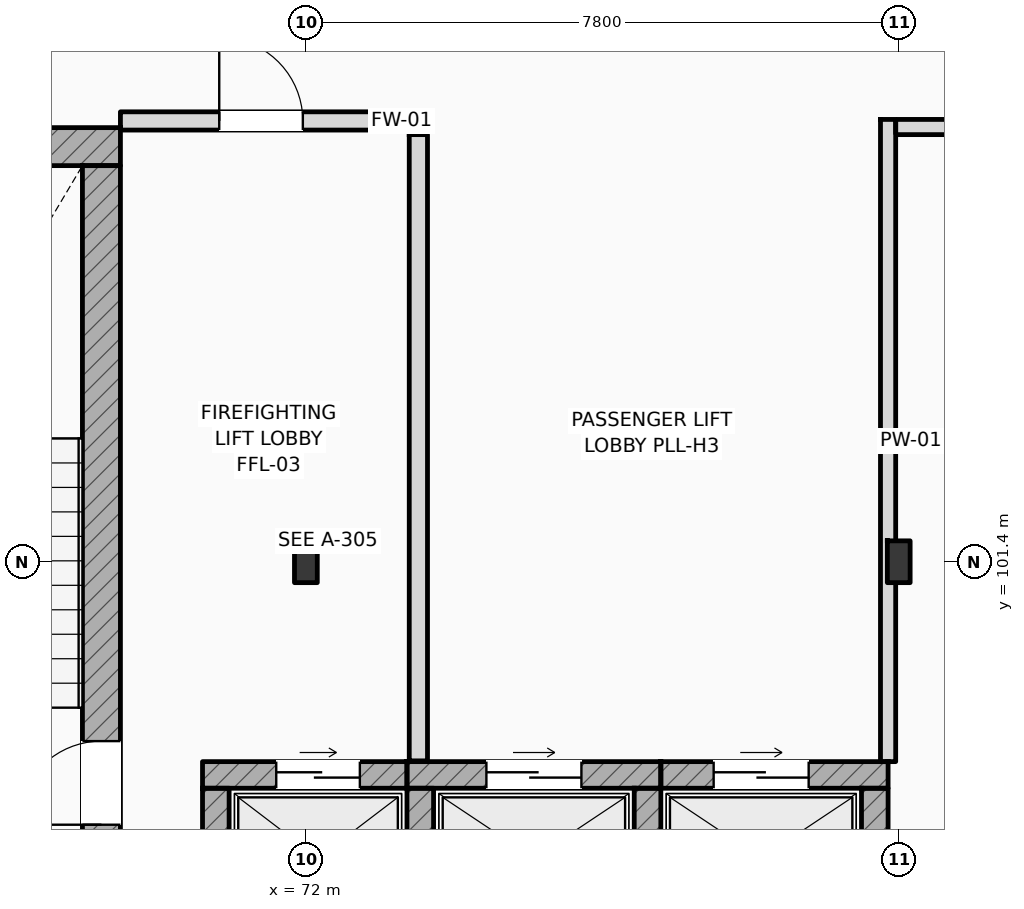
"""IFC4 building model, lengths in metres.
Left out: names, types, materials, properties, quantities, classifications, styles, units other than length and angle.
Written with IfcOpenShell. Run it as: python <this file> out.ifc"""

import sys

from ifc_helpers import new_model, si_unit, direction, frame, frame_2d, origin, origin_2d, place, context, subcontext, project, spatial, rectangle, i_section, extrude, element, fill, save


model = new_model("IFC4")
c1 = context("Model", 3, precision=1e-05, world=origin(), true_north=direction((0.0, 1.0)))
c2 = subcontext(c1, "Body", "Model", "MODEL_VIEW")
j1 = project(units=[si_unit("LENGTHUNIT", "METRE"), si_unit("PLANEANGLEUNIT", "RADIAN")], contexts=[c1])
p1 = place(None, origin())
s1 = spatial("IfcSite", under=j1, at=p1, CompositionType="ELEMENT")
p2 = place(p1, origin())
s2 = spatial("IfcBuilding", under=s1, at=p2, CompositionType="ELEMENT")
p3 = place(p2, frame((0.0, 0.0, 16.2)))
s3 = spatial("IfcBuildingStorey", under=s2, at=p3, CompositionType="ELEMENT", Elevation=16.2)
for number, where, z_axis, x_axis in (
    (1, (72.0, 101.4, 0.0), (0.0, 0.0, 1.0), (1.0, 0.0, 0.0)),
    (2, (79.8, 101.4, 0.0), (0.0, 0.0, 1.0), (1.0, 0.0, 0.0)),
):
    element("IfcColumn", number, at=place(p3, frame(where, z_axis=z_axis, x_axis=x_axis)), inside=s3, PredefinedType="COLUMN", context=c2, shape_type="SweptSolid", body=[
        extrude(i_section(OverallWidth=0.3, OverallDepth=0.55, WebThickness=0.015, FlangeThickness=0.029, FilletRadius=0.027, at=origin_2d()), origin(), (0.0, 0.0, 1.0), 4.2),
    ])
p4 = place(p3, frame((64.4, 106.862, 0.0), z_axis=(0.0, 0.0, 1.0), x_axis=(1.0, 0.0, 0.0)))
e3 = element("IfcWall", 3, at=p4, inside=s3, PredefinedType="SHEAR", context=c2, shape_type="SweptSolid", body=[
    extrude(rectangle(XDim=5.16, YDim=0.5, at=frame_2d((2.58, 0.0))), origin(), (0.0, 0.0, 1.0), 4.2),
])
p5 = place(p3, frame((69.31, 97.5, 0.0), z_axis=(0.0, 0.0, 1.0), x_axis=(0.0, 1.0, 0.0)))
e4 = element("IfcWall", 4, at=p5, inside=s3, PredefinedType="SHEAR", context=c2, shape_type="SweptSolid", body=[
    extrude(rectangle(XDim=9.112, YDim=0.5, at=frame_2d((4.556, 0.0))), origin(), (0.0, 0.0, 1.0), 4.2),
])
p6 = place(p5, frame((0.44, 0.0, 0.0)))
e5 = element("IfcOpeningElement", 5, at=p6, cuts=e4, PredefinedType="OPENING", context=c2, shape_type="SweptSolid", body=[
    extrude(rectangle(XDim=1.1, YDim=2.2, at=frame_2d((0.55, 1.1))), frame((0.0, 0.26, 0.0), z_axis=(0.0, -1.0, 0.0), x_axis=(1.0, 0.0, 0.0)), (0.0, 0.0, 1.0), 0.52),
])
p7 = place(p3, frame((70.64, 98.595, 0.0), z_axis=(0.0, 0.0, 1.0), x_axis=(1.0, 0.0, 0.0)))
e6 = element("IfcWall", 6, at=p7, inside=s3, PredefinedType="SHEAR", context=c2, shape_type="SweptSolid", body=[
    extrude(rectangle(XDim=2.69, YDim=0.35, at=frame_2d((1.345, 0.0))), origin(), (0.0, 0.0, 1.0), 3.92),
])
p8 = place(p7, frame((0.97, 0.0, 0.0)))
e7 = element("IfcOpeningElement", 7, at=p8, cuts=e6, PredefinedType="OPENING", context=c2, shape_type="SweptSolid", body=[
    extrude(rectangle(XDim=1.1, YDim=2.2, at=frame_2d((0.55, 1.1))), frame((0.0, 0.185, 0.0), z_axis=(0.0, -1.0, 0.0), x_axis=(1.0, 0.0, 0.0)), (0.0, 0.0, 1.0), 0.37),
])
p9 = place(p3, frame((70.815, 96.58, 0.0), z_axis=(0.0, 0.0, 1.0), x_axis=(0.0, 1.0, 0.0)))
e8 = element("IfcWall", 8, at=p9, inside=s3, PredefinedType="SHEAR", context=c2, shape_type="SweptSolid", body=[
    extrude(rectangle(XDim=1.84, YDim=0.35, at=frame_2d((0.92, 0.0))), origin(), (0.0, 0.0, 1.0), 3.92),
])
p10 = place(p3, frame((73.33, 98.595, 0.0), z_axis=(0.0, 0.0, 1.0), x_axis=(1.0, 0.0, 0.0)))
e9 = element("IfcWall", 9, at=p10, inside=s3, PredefinedType="SHEAR", context=c2, shape_type="SweptSolid", body=[
    extrude(rectangle(XDim=3.34, YDim=0.35, at=frame_2d((1.67, 0.0))), origin(), (0.0, 0.0, 1.0), 3.92),
])
p11 = place(p10, frame((1.045, 0.0, 0.0)))
e10 = element("IfcOpeningElement", 10, at=p11, cuts=e9, PredefinedType="OPENING", context=c2, shape_type="SweptSolid", body=[
    extrude(rectangle(XDim=1.25, YDim=2.25, at=frame_2d((0.625, 1.125))), frame((0.0, 0.185, 0.0), z_axis=(0.0, -1.0, 0.0), x_axis=(1.0, 0.0, 0.0)), (0.0, 0.0, 1.0), 0.37),
])
for number, where, z_axis, x_axis in (
    (11, (73.505, 96.58, 0.0), (0.0, 0.0, 1.0), (0.0, 1.0, 0.0)),
    (12, (76.495, 96.58, 0.0), (0.0, 0.0, 1.0), (0.0, 1.0, 0.0)),
):
    element("IfcWall", number, at=place(p3, frame(where, z_axis=z_axis, x_axis=x_axis)), inside=s3, PredefinedType="SHEAR", context=c2, shape_type="SweptSolid", body=[
        extrude(rectangle(XDim=1.84, YDim=0.35, at=frame_2d((0.92, 0.0))), origin(), (0.0, 0.0, 1.0), 3.92),
    ])
p12 = place(p3, frame((76.67, 98.595, 0.0), z_axis=(0.0, 0.0, 1.0), x_axis=(1.0, 0.0, 0.0)))
e13 = element("IfcWall", 13, at=p12, inside=s3, PredefinedType="SHEAR", context=c2, shape_type="SweptSolid", body=[
    extrude(rectangle(XDim=2.99, YDim=0.35, at=frame_2d((1.495, 0.0))), origin(), (0.0, 0.0, 1.0), 3.92),
])
p13 = place(p12, frame((0.695, 0.0, 0.0)))
e14 = element("IfcOpeningElement", 14, at=p13, cuts=e13, PredefinedType="OPENING", context=c2, shape_type="SweptSolid", body=[
    extrude(rectangle(XDim=1.25, YDim=2.25, at=frame_2d((0.625, 1.125))), frame((0.0, 0.185, 0.0), z_axis=(0.0, -1.0, 0.0), x_axis=(1.0, 0.0, 0.0)), (0.0, 0.0, 1.0), 0.37),
])
p14 = place(p3, frame((79.485, 96.58, 0.0), z_axis=(0.0, 0.0, 1.0), x_axis=(0.0, 1.0, 0.0)))
e15 = element("IfcWall", 15, at=p14, inside=s3, PredefinedType="SHEAR", context=c2, shape_type="SweptSolid", body=[
    extrude(rectangle(XDim=1.84, YDim=0.35, at=frame_2d((0.92, 0.0))), origin(), (0.0, 0.0, 1.0), 3.51),
])
p15 = place(p3, frame((73.48, 98.78, 0.0), z_axis=(0.0, 0.0, 1.0), x_axis=(0.0, 1.0, 0.0)))
e16 = element("IfcWall", 16, at=p15, inside=s3, PredefinedType="STANDARD", context=c2, shape_type="SweptSolid", body=[
    extrude(rectangle(XDim=8.24, YDim=0.24, at=frame_2d((4.12, 0.0))), origin(), (0.0, 0.0, 1.0), 3.92),
])
p16 = place(p3, frame((69.56, 107.2, 0.0), z_axis=(0.0, 0.0, 1.0), x_axis=(1.0, 0.0, 0.0)))
e17 = element("IfcWall", 17, at=p16, inside=s3, PredefinedType="STANDARD", context=c2, shape_type="SweptSolid", body=[
    extrude(rectangle(XDim=4.1, YDim=0.24, at=frame_2d((2.05, 0.0))), origin(), (0.0, 0.0, 1.0), 3.92),
])
p17 = place(p16, frame((1.3, 0.0, 0.0)))
e18 = element("IfcOpeningElement", 18, at=p17, cuts=e17, PredefinedType="OPENING", context=c2, shape_type="SweptSolid", body=[
    extrude(rectangle(XDim=1.1, YDim=2.2, at=frame_2d((0.55, 1.1))), frame((0.0, 0.13, 0.0), z_axis=(0.0, -1.0, 0.0), x_axis=(1.0, 0.0, 0.0)), (0.0, 0.0, 1.0), 0.26),
])
p18 = place(p3, frame((79.76, 107.12, 0.0), z_axis=(0.0, 0.0, 1.0), x_axis=(1.0, 0.0, 0.0)))
e19 = element("IfcWall", 19, at=p18, inside=s3, PredefinedType="PARTITIONING", context=c2, shape_type="SweptSolid", body=[
    extrude(rectangle(XDim=40.1, YDim=0.2, at=frame_2d((20.05, 0.0))), origin(), (0.0, 0.0, 1.0), 3.92),
])
p19 = place(p18, frame((9.35, 0.0, 0.0)))
e20 = element("IfcOpeningElement", 20, at=p19, cuts=e19, PredefinedType="OPENING", context=c2, shape_type="SweptSolid", body=[
    extrude(rectangle(XDim=1.3, YDim=2.2, at=frame_2d((0.65, 1.1))), frame((0.0, 0.11, 0.0), z_axis=(0.0, -1.0, 0.0), x_axis=(1.0, 0.0, 0.0)), (0.0, 0.0, 1.0), 0.22),
])
p20 = place(p18, frame((28.85, 0.0, 0.0)))
e21 = element("IfcOpeningElement", 21, at=p20, cuts=e19, PredefinedType="OPENING", context=c2, shape_type="SweptSolid", body=[
    extrude(rectangle(XDim=1.3, YDim=2.2, at=frame_2d((0.65, 1.1))), frame((0.0, 0.11, 0.0), z_axis=(0.0, -1.0, 0.0), x_axis=(1.0, 0.0, 0.0)), (0.0, 0.0, 1.0), 0.22),
])
p21 = place(p3, frame((79.66, 98.77, 0.0), z_axis=(0.0, 0.0, 1.0), x_axis=(0.0, 1.0, 0.0)))
e22 = element("IfcWall", 22, at=p21, inside=s3, PredefinedType="PARTITIONING", context=c2, shape_type="SweptSolid", body=[
    extrude(rectangle(XDim=8.45, YDim=0.2, at=frame_2d((4.225, 0.0))), origin(), (0.0, 0.0, 1.0), 3.51),
])
p22 = place(p6, origin())
e23 = element("IfcDoor", 23, at=p22, inside=s3, OperationType="SINGLE_SWING_LEFT", PredefinedType="DOOR", context=c2, shape_type="SweptSolid", body=[
    extrude(rectangle(XDim=1.1, YDim=2.2, at=frame_2d((0.55, 1.1))), frame((0.0, 0.025, 0.0), z_axis=(0.0, -1.0, 0.0), x_axis=(1.0, 0.0, 0.0)), (0.0, 0.0, 1.0), 0.05),
])
fill(e5, e23)
p23 = place(p8, origin())
e24 = element("IfcDoor", 24, at=p23, inside=s3, OperationType="SLIDING_TO_LEFT", PredefinedType="DOOR", context=c2, shape_type="SweptSolid", body=[
    extrude(rectangle(XDim=1.1, YDim=2.2, at=frame_2d((0.55, 1.1))), frame((0.0, 0.025, 0.0), z_axis=(0.0, -1.0, 0.0), x_axis=(1.0, 0.0, 0.0)), (0.0, 0.0, 1.0), 0.05),
])
fill(e7, e24)
p24 = place(p11, origin())
e25 = element("IfcDoor", 25, at=p24, inside=s3, OperationType="SLIDING_TO_LEFT", PredefinedType="DOOR", context=c2, shape_type="SweptSolid", body=[
    extrude(rectangle(XDim=1.25, YDim=2.25, at=frame_2d((0.625, 1.125))), frame((0.0, 0.025, 0.0), z_axis=(0.0, -1.0, 0.0), x_axis=(1.0, 0.0, 0.0)), (0.0, 0.0, 1.0), 0.05),
])
fill(e10, e25)
p25 = place(p13, origin())
e26 = element("IfcDoor", 26, at=p25, inside=s3, OperationType="SLIDING_TO_LEFT", PredefinedType="DOOR", context=c2, shape_type="SweptSolid", body=[
    extrude(rectangle(XDim=1.25, YDim=2.25, at=frame_2d((0.625, 1.125))), frame((0.0, 0.025, 0.0), z_axis=(0.0, -1.0, 0.0), x_axis=(1.0, 0.0, 0.0)), (0.0, 0.0, 1.0), 0.05),
])
fill(e14, e26)
p26 = place(p17, origin())
e27 = element("IfcDoor", 27, at=p26, inside=s3, OperationType="SINGLE_SWING_LEFT", PredefinedType="DOOR", context=c2, shape_type="SweptSolid", body=[
    extrude(rectangle(XDim=1.1, YDim=2.2, at=frame_2d((0.55, 1.1))), frame((0.0, 0.025, 0.0), z_axis=(0.0, -1.0, 0.0), x_axis=(1.0, 0.0, 0.0)), (0.0, 0.0, 1.0), 0.05),
])
fill(e18, e27)
save(model, sys.argv[1])
